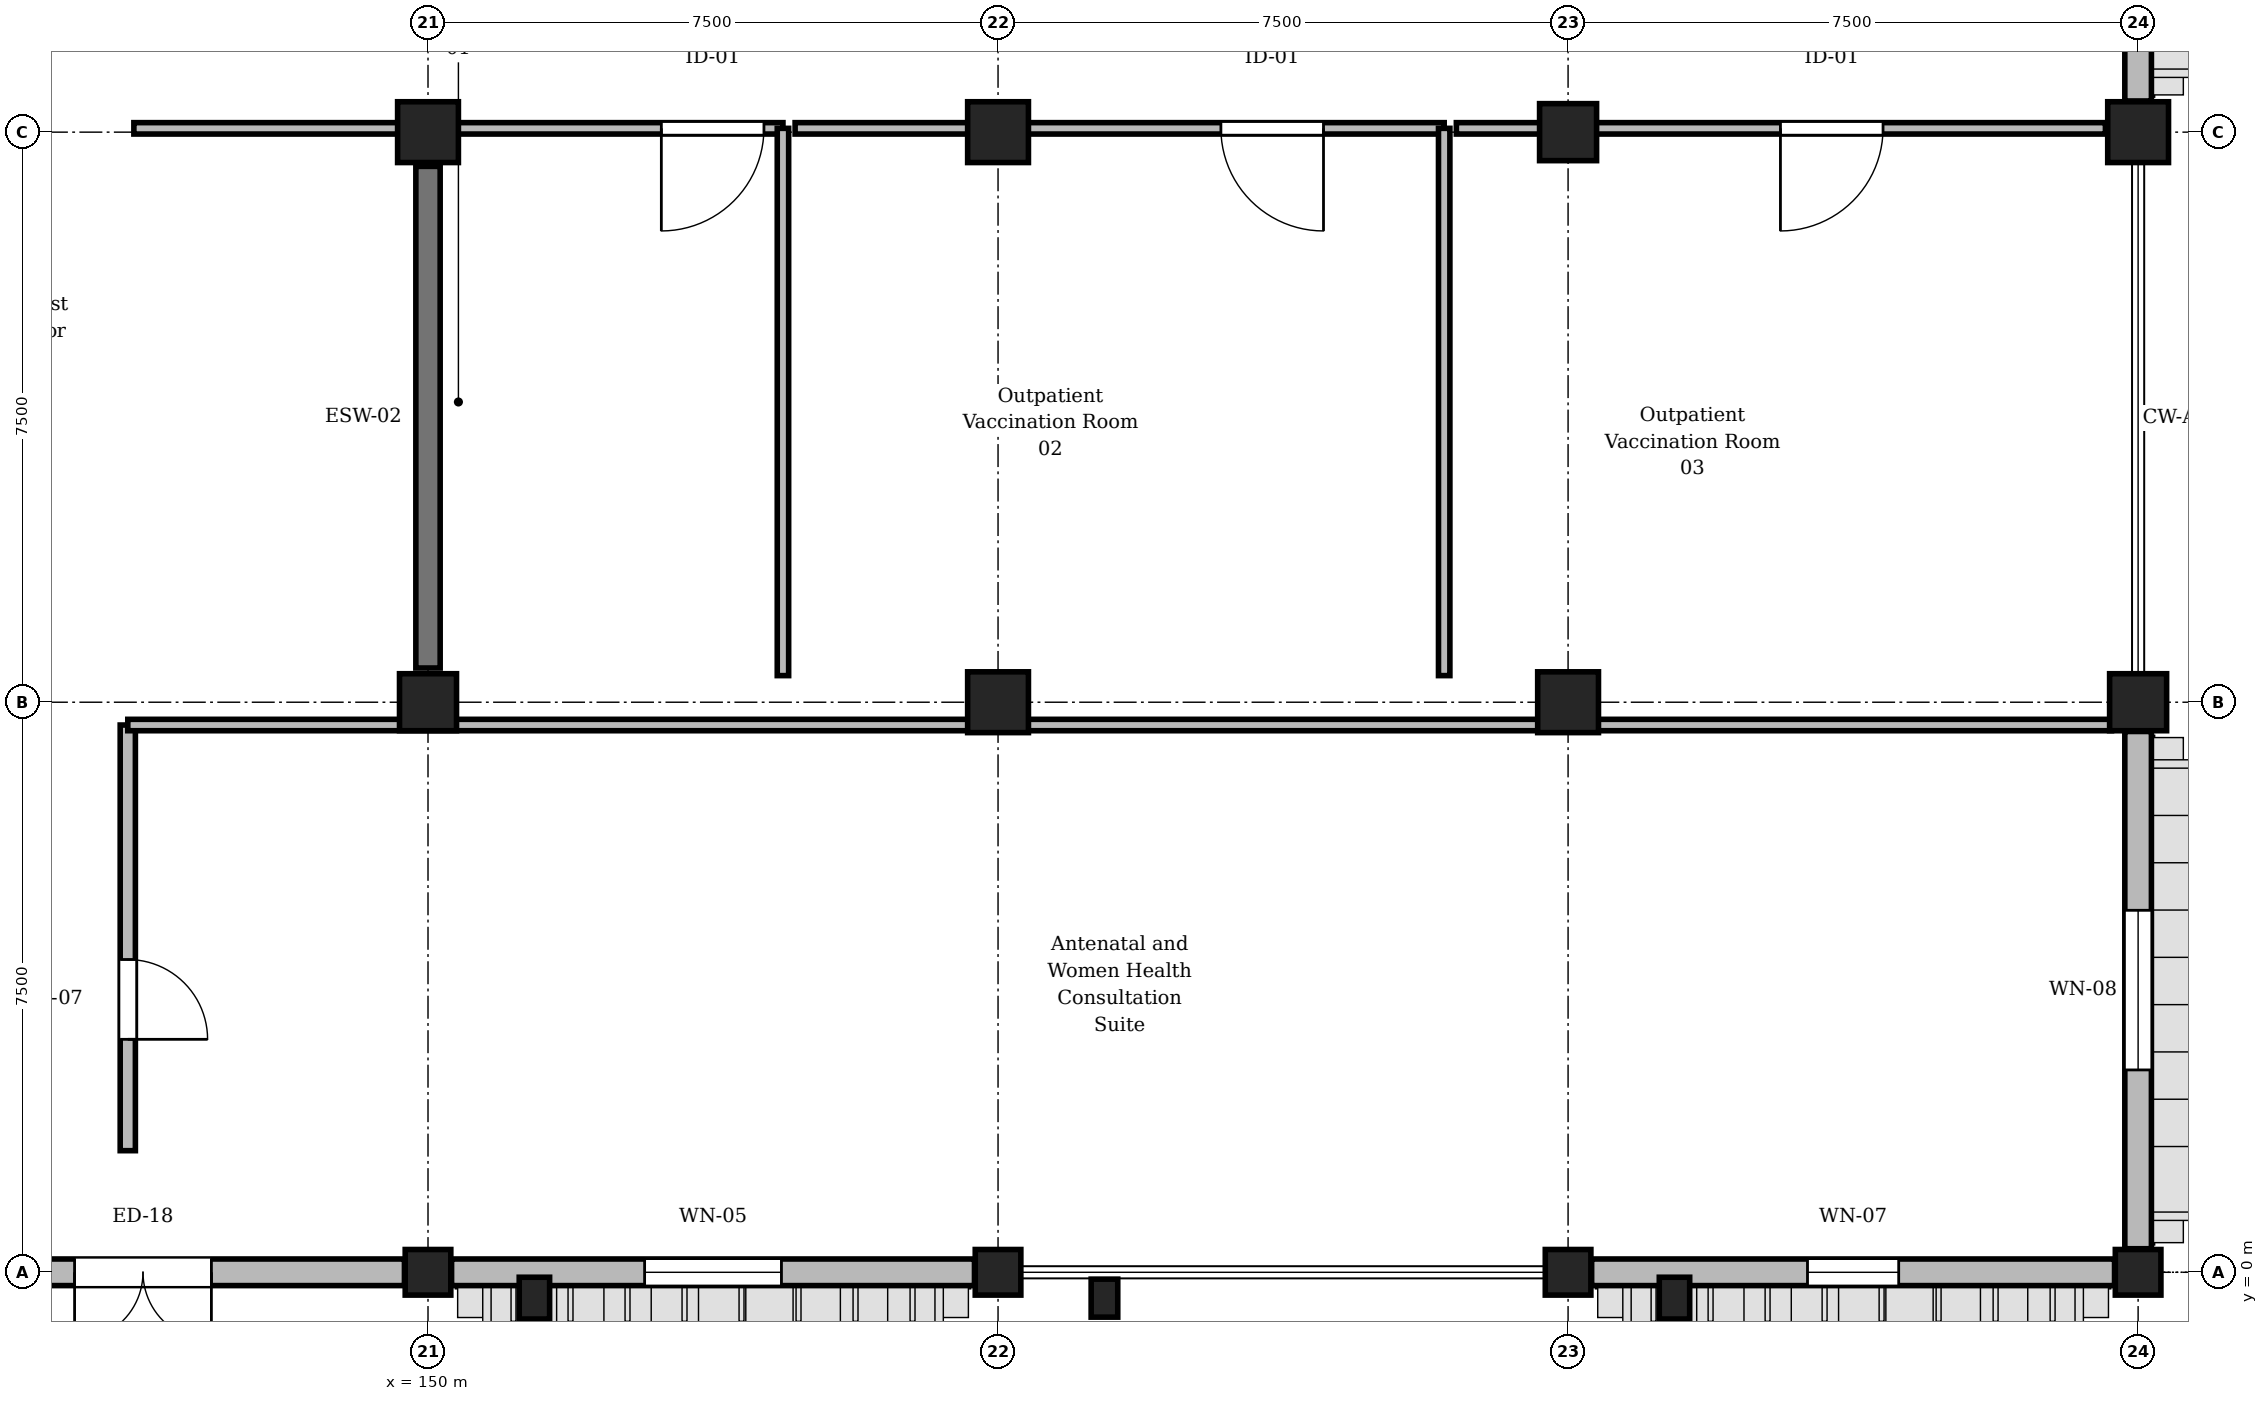
"""IFC4 building model, lengths in metres.
Left out: names, types, materials, properties, quantities, classifications, styles, units other than length and angle.
Written with IfcOpenShell. Run it as: python <this file> out.ifc"""

import sys

from ifc_helpers import new_model, si_unit, direction, frame, frame_2d, origin, origin_2d, place, context, subcontext, project, spatial, rectangle, circle, extrude, element, fill, save


model = new_model("IFC4")
c1 = context("Model", 3, precision=1e-05, world=origin(), true_north=direction((0.0, 1.0)))
c2 = subcontext(c1, "Body", "Model", "MODEL_VIEW")
j1 = project(units=[si_unit("LENGTHUNIT", "METRE"), si_unit("PLANEANGLEUNIT", "RADIAN")], contexts=[c1])
p1 = place(None, origin())
s1 = spatial("IfcSite", under=j1, at=p1, CompositionType="ELEMENT")
p2 = place(p1, origin())
s2 = spatial("IfcBuilding", under=s1, at=p2, CompositionType="ELEMENT")
p3 = place(p2, origin())
s3 = spatial("IfcBuildingStorey", under=s2, at=p3, CompositionType="ELEMENT", Elevation=0.0)
p4 = place(p3, frame((150.0, 0.0, 0.0), z_axis=(0.0, 0.0, 1.0), x_axis=(1.0, 0.0, 0.0)))
e1 = element("IfcColumn", 1, at=p4, inside=s3, PredefinedType="COLUMN", context=c2, shape_type="SweptSolid", body=[
    extrude(rectangle(XDim=0.6, YDim=0.6, at=origin_2d()), origin(), (0.0, 0.0, 1.0), 4.8),
])
p5 = place(p3, frame((150.0, 7.5, 0.0), z_axis=(0.0, 0.0, 1.0), x_axis=(1.0, 0.0, 0.0)))
e2 = element("IfcColumn", 2, at=p5, inside=s3, PredefinedType="COLUMN", context=c2, shape_type="SweptSolid", body=[
    extrude(circle(Radius=0.375, at=origin_2d()), origin(), (0.0, 0.0, 1.0), 4.8),
])
p6 = place(p3, frame((150.0, 15.0, 0.0), z_axis=(0.0, 0.0, 1.0), x_axis=(1.0, 0.0, 0.0)))
e3 = element("IfcColumn", 3, at=p6, inside=s3, PredefinedType="COLUMN", context=c2, shape_type="SweptSolid", body=[
    extrude(rectangle(XDim=0.8, YDim=0.8, at=origin_2d()), origin(), (0.0, 0.0, 1.0), 4.8),
])
p7 = place(p3, frame((157.5, 0.0, 0.0), z_axis=(0.0, 0.0, 1.0), x_axis=(1.0, 0.0, 0.0)))
e4 = element("IfcColumn", 4, at=p7, inside=s3, PredefinedType="COLUMN", context=c2, shape_type="SweptSolid", body=[
    extrude(circle(Radius=0.3, at=origin_2d()), origin(), (0.0, 0.0, 1.0), 4.8),
])
for number, where, z_axis, x_axis in (
    (5, (157.5, 7.5, 0.0), (0.0, 0.0, 1.0), (1.0, 0.0, 0.0)),
    (6, (157.5, 15.0, 0.0), (0.0, 0.0, 1.0), (1.0, 0.0, 0.0)),
):
    element("IfcColumn", number, at=place(p3, frame(where, z_axis=z_axis, x_axis=x_axis)), inside=s3, PredefinedType="COLUMN", context=c2, shape_type="SweptSolid", body=[
        extrude(rectangle(XDim=0.8, YDim=0.8, at=origin_2d()), origin(), (0.0, 0.0, 1.0), 4.8),
    ])
p8 = place(p3, frame((165.0, 0.0, 0.0), z_axis=(0.0, 0.0, 1.0), x_axis=(1.0, 0.0, 0.0)))
e7 = element("IfcColumn", 7, at=p8, inside=s3, PredefinedType="COLUMN", context=c2, shape_type="SweptSolid", body=[
    extrude(rectangle(XDim=0.6, YDim=0.6, at=origin_2d()), origin(), (0.0, 0.0, 1.0), 4.8),
])
p9 = place(p3, frame((165.0, 7.5, 0.0), z_axis=(0.0, 0.0, 1.0), x_axis=(1.0, 0.0, 0.0)))
e8 = element("IfcColumn", 8, at=p9, inside=s3, PredefinedType="COLUMN", context=c2, shape_type="SweptSolid", body=[
    extrude(rectangle(XDim=0.8, YDim=0.8, at=origin_2d()), origin(), (0.0, 0.0, 1.0), 4.8),
])
p10 = place(p3, frame((165.0, 15.0, 0.0), z_axis=(0.0, 0.0, 1.0), x_axis=(1.0, 0.0, 0.0)))
e9 = element("IfcColumn", 9, at=p10, inside=s3, PredefinedType="COLUMN", context=c2, shape_type="SweptSolid", body=[
    extrude(circle(Radius=0.375, at=origin_2d()), origin(), (0.0, 0.0, 1.0), 4.8),
])
p11 = place(p3, frame((172.5, 0.0, 0.0), z_axis=(0.0, 0.0, 1.0), x_axis=(1.0, 0.0, 0.0)))
e10 = element("IfcColumn", 10, at=p11, inside=s3, PredefinedType="COLUMN", context=c2, shape_type="SweptSolid", body=[
    extrude(rectangle(XDim=0.6, YDim=0.6, at=origin_2d()), origin(), (0.0, 0.0, 1.0), 4.8),
])
p12 = place(p3, frame((172.5, 7.5, 0.0), z_axis=(0.0, 0.0, 1.0), x_axis=(1.0, 0.0, 0.0)))
e11 = element("IfcColumn", 11, at=p12, inside=s3, PredefinedType="COLUMN", context=c2, shape_type="SweptSolid", body=[
    extrude(circle(Radius=0.375, at=origin_2d()), origin(), (0.0, 0.0, 1.0), 4.8),
])
p13 = place(p3, frame((172.5, 15.0, 0.0), z_axis=(0.0, 0.0, 1.0), x_axis=(1.0, 0.0, 0.0)))
e12 = element("IfcColumn", 12, at=p13, inside=s3, PredefinedType="COLUMN", context=c2, shape_type="SweptSolid", body=[
    extrude(rectangle(XDim=0.8, YDim=0.8, at=origin_2d()), origin(), (0.0, 0.0, 1.0), 4.8),
])
p14 = place(p3, frame((151.4, -0.34, 0.0), z_axis=(0.0, 0.0, 1.0), x_axis=(1.0, 0.0, 0.0)))
e13 = element("IfcColumn", 13, at=p14, inside=s3, PredefinedType="PILASTER", context=c2, shape_type="SweptSolid", body=[
    extrude(rectangle(XDim=0.4, YDim=0.55, at=origin_2d()), origin(), (0.0, 0.0, 1.0), 4.1),
])
p15 = place(p3, frame((158.9, -0.34, 0.0), z_axis=(0.0, 0.0, 1.0), x_axis=(1.0, 0.0, 0.0)))
e14 = element("IfcColumn", 14, at=p15, inside=s3, PredefinedType="PILASTER", context=c2, shape_type="SweptSolid", body=[
    extrude(rectangle(XDim=0.35, YDim=0.5, at=origin_2d()), origin(), (0.0, 0.0, 1.0), 4.1),
])
p16 = place(p3, frame((166.4, -0.34, 0.0), z_axis=(0.0, 0.0, 1.0), x_axis=(1.0, 0.0, 0.0)))
e15 = element("IfcColumn", 15, at=p16, inside=s3, PredefinedType="PILASTER", context=c2, shape_type="SweptSolid", body=[
    extrude(rectangle(XDim=0.4, YDim=0.55, at=origin_2d()), origin(), (0.0, 0.0, 1.0), 4.1),
])
p17 = place(p3, frame((150.0, 7.95, 0.0), z_axis=(0.0, 0.0, 1.0), x_axis=(0.0, 1.0, 0.0)))
e16 = element("IfcWall", 16, at=p17, inside=s3, PredefinedType="SHEAR", context=c2, shape_type="SweptSolid", body=[
    extrude(rectangle(XDim=6.6, YDim=0.32, at=frame_2d((3.3, 0.0))), origin(), (0.0, 0.0, 1.0), 3.95),
])
p18 = place(p3, frame((149.69, 0.0, 0.0), z_axis=(0.0, 0.0, 1.0), x_axis=(-1.0, 0.0, 0.0)))
e17 = element("IfcWall", 17, at=p18, inside=s3, PredefinedType="STANDARD", context=c2, shape_type="SweptSolid", body=[
    extrude(rectangle(XDim=6.88, YDim=0.35, at=frame_2d((3.44, 0.0))), origin(), (0.0, 0.0, 1.0), 3.95),
])
p19 = place(p18, frame((2.54, 0.0, 0.0)))
e18 = element("IfcOpeningElement", 18, at=p19, cuts=e17, PredefinedType="OPENING", context=c2, shape_type="SweptSolid", body=[
    extrude(rectangle(XDim=1.8, YDim=2.5, at=frame_2d((0.9, 1.25))), frame((0.0, 0.185, 0.0), z_axis=(0.0, -1.0, 0.0), x_axis=(1.0, 0.0, 0.0)), (0.0, 0.0, 1.0), 0.37),
])
p20 = place(p3, frame((157.19, 0.0, 0.0), z_axis=(0.0, 0.0, 1.0), x_axis=(-1.0, 0.0, 0.0)))
e19 = element("IfcWall", 19, at=p20, inside=s3, PredefinedType="STANDARD", context=c2, shape_type="SweptSolid", body=[
    extrude(rectangle(XDim=6.88, YDim=0.35, at=frame_2d((3.44, 0.0))), origin(), (0.0, 0.0, 1.0), 3.95),
])
p21 = place(p20, frame((2.54, 0.0, 0.9)))
e20 = element("IfcOpeningElement", 20, at=p21, cuts=e19, PredefinedType="OPENING", context=c2, shape_type="SweptSolid", body=[
    extrude(rectangle(XDim=1.8, YDim=2.1, at=frame_2d((0.9, 1.05))), frame((0.0, 0.185, 0.0), z_axis=(0.0, -1.0, 0.0), x_axis=(1.0, 0.0, 0.0)), (0.0, 0.0, 1.0), 0.37),
])
p22 = place(p3, frame((172.19, 0.0, 0.0), z_axis=(0.0, 0.0, 1.0), x_axis=(-1.0, 0.0, 0.0)))
e21 = element("IfcWall", 21, at=p22, inside=s3, PredefinedType="STANDARD", context=c2, shape_type="SweptSolid", body=[
    extrude(rectangle(XDim=6.88, YDim=0.35, at=frame_2d((3.44, 0.0))), origin(), (0.0, 0.0, 1.0), 3.95),
])
p23 = place(p22, frame((2.84, 0.0, 0.9)))
e22 = element("IfcOpeningElement", 22, at=p23, cuts=e21, PredefinedType="OPENING", context=c2, shape_type="SweptSolid", body=[
    extrude(rectangle(XDim=1.2, YDim=2.1, at=frame_2d((0.6, 1.05))), frame((0.0, 0.185, 0.0), z_axis=(0.0, -1.0, 0.0), x_axis=(1.0, 0.0, 0.0)), (0.0, 0.0, 1.0), 0.37),
])
p24 = place(p3, frame((172.5, 7.115, 0.0), z_axis=(0.0, 0.0, 1.0), x_axis=(0.0, -1.0, 0.0)))
e23 = element("IfcWall", 23, at=p24, inside=s3, PredefinedType="STANDARD", context=c2, shape_type="SweptSolid", body=[
    extrude(rectangle(XDim=6.805, YDim=0.35, at=frame_2d((3.402, 0.0))), origin(), (0.0, 0.0, 1.0), 3.9),
])
p25 = place(p24, frame((2.353, 0.0, 0.9)))
e24 = element("IfcOpeningElement", 24, at=p25, cuts=e23, PredefinedType="OPENING", context=c2, shape_type="SweptSolid", body=[
    extrude(rectangle(XDim=2.1, YDim=2.1, at=frame_2d((1.05, 1.05))), frame((0.0, 0.185, 0.0), z_axis=(0.0, -1.0, 0.0), x_axis=(1.0, 0.0, 0.0)), (0.0, 0.0, 1.0), 0.37),
])
p26 = place(p3, frame((172.5, 22.09, 0.0), z_axis=(0.0, 0.0, 1.0), x_axis=(0.0, -1.0, 0.0)))
e25 = element("IfcWall", 25, at=p26, inside=s3, PredefinedType="STANDARD", context=c2, shape_type="SweptSolid", body=[
    extrude(rectangle(XDim=6.68, YDim=0.35, at=frame_2d((3.34, 0.0))), origin(), (0.0, 0.0, 1.0), 3.9),
])
p27 = place(p26, frame((2.54, 0.0, 0.9)))
e26 = element("IfcOpeningElement", 26, at=p27, cuts=e25, PredefinedType="OPENING", context=c2, shape_type="SweptSolid", body=[
    extrude(rectangle(XDim=1.6, YDim=1.95, at=frame_2d((0.8, 0.975))), frame((0.0, 0.185, 0.0), z_axis=(0.0, -1.0, 0.0), x_axis=(1.0, 0.0, 0.0)), (0.0, 0.0, 1.0), 0.37),
])
p28 = place(p3, frame((146.05, 7.2, 0.0), z_axis=(0.0, 0.0, 1.0), x_axis=(0.0, -1.0, 0.0)))
e27 = element("IfcWall", 27, at=p28, inside=s3, PredefinedType="STANDARD", context=c2, shape_type="SweptSolid", body=[
    extrude(rectangle(XDim=5.6, YDim=0.2, at=frame_2d((2.8, 0.0))), origin(), (0.0, 0.0, 1.0), 4.485),
])
p29 = place(p28, frame((3.085, 0.0, 0.0)))
e28 = element("IfcOpeningElement", 28, at=p29, cuts=e27, PredefinedType="OPENING", context=c2, shape_type="SweptSolid", body=[
    extrude(rectangle(XDim=1.05, YDim=2.2, at=frame_2d((0.525, 1.1))), frame((0.0, 0.11, 0.0), z_axis=(0.0, -1.0, 0.0), x_axis=(1.0, 0.0, 0.0)), (0.0, 0.0, 1.0), 0.22),
])
p30 = place(p3, frame((154.67, 15.05, 0.0), z_axis=(0.0, 0.0, 1.0), x_axis=(-1.0, 0.0, 0.0)))
e29 = element("IfcWall", 29, at=p30, inside=s3, PredefinedType="PARTITIONING", context=c2, shape_type="SweptSolid", body=[
    extrude(rectangle(XDim=8.54, YDim=0.15, at=frame_2d((4.27, 0.0))), origin(), (0.0, 0.0, 1.0), 3.835),
])
p31 = place(p30, frame((0.25, 0.0, 0.0)))
e30 = element("IfcOpeningElement", 30, at=p31, cuts=e29, PredefinedType="OPENING", context=c2, shape_type="SweptSolid", body=[
    extrude(rectangle(XDim=1.35, YDim=2.25, at=frame_2d((0.675, 1.125))), frame((0.0, 0.085, 0.0), z_axis=(0.0, -1.0, 0.0), x_axis=(1.0, 0.0, 0.0)), (0.0, 0.0, 1.0), 0.17),
])
p32 = place(p3, frame((163.37, 15.05, 0.0), z_axis=(0.0, 0.0, 1.0), x_axis=(-1.0, 0.0, 0.0)))
e31 = element("IfcWall", 31, at=p32, inside=s3, PredefinedType="PARTITIONING", context=c2, shape_type="SweptSolid", body=[
    extrude(rectangle(XDim=8.54, YDim=0.15, at=frame_2d((4.27, 0.0))), origin(), (0.0, 0.0, 1.0), 3.835),
])
p33 = place(p32, frame((1.588, 0.0, 0.0)))
e32 = element("IfcOpeningElement", 32, at=p33, cuts=e31, PredefinedType="OPENING", context=c2, shape_type="SweptSolid", body=[
    extrude(rectangle(XDim=1.35, YDim=2.25, at=frame_2d((0.675, 1.125))), frame((0.0, 0.085, 0.0), z_axis=(0.0, -1.0, 0.0), x_axis=(1.0, 0.0, 0.0)), (0.0, 0.0, 1.0), 0.17),
])
p34 = place(p3, frame((172.07, 15.05, 0.0), z_axis=(0.0, 0.0, 1.0), x_axis=(-1.0, 0.0, 0.0)))
e33 = element("IfcWall", 33, at=p34, inside=s3, PredefinedType="PARTITIONING", context=c2, shape_type="SweptSolid", body=[
    extrude(rectangle(XDim=8.54, YDim=0.15, at=frame_2d((4.27, 0.0))), origin(), (0.0, 0.0, 1.0), 3.835),
])
p35 = place(p34, frame((2.926, 0.0, 0.0)))
e34 = element("IfcOpeningElement", 34, at=p35, cuts=e33, PredefinedType="OPENING", context=c2, shape_type="SweptSolid", body=[
    extrude(rectangle(XDim=1.35, YDim=2.25, at=frame_2d((0.675, 1.125))), frame((0.0, 0.085, 0.0), z_axis=(0.0, -1.0, 0.0), x_axis=(1.0, 0.0, 0.0)), (0.0, 0.0, 1.0), 0.17),
])
p36 = place(p3, frame((146.05, 7.2, 0.0), z_axis=(0.0, 0.0, 1.0), x_axis=(1.0, 0.0, 0.0)))
e35 = element("IfcWall", 35, at=p36, inside=s3, PredefinedType="PARTITIONING", context=c2, shape_type="SweptSolid", body=[
    extrude(rectangle(XDim=26.1, YDim=0.15, at=frame_2d((13.05, 0.0))), origin(), (0.0, 0.0, 1.0), 3.835),
])
for number, where, z_axis, x_axis in (
    (36, (154.67, 7.85, 0.0), (0.0, 0.0, 1.0), (0.0, 1.0, 0.0)),
    (37, (163.37, 7.85, 0.0), (0.0, 0.0, 1.0), (0.0, 1.0, 0.0)),
):
    element("IfcWall", number, at=place(p3, frame(where, z_axis=z_axis, x_axis=x_axis)), inside=s3, PredefinedType="PARTITIONING", context=c2, shape_type="SweptSolid", body=[
        extrude(rectangle(XDim=7.2, YDim=0.15, at=frame_2d((3.6, 0.0))), origin(), (0.0, 0.0, 1.0), 4.485),
    ])
p37 = place(p19, origin())
e38 = element("IfcDoor", 38, at=p37, inside=s3, OperationType="DOUBLE_DOOR_SINGLE_SWING", PredefinedType="DOOR", context=c2, shape_type="SweptSolid", body=[
    extrude(rectangle(XDim=1.8, YDim=2.5, at=frame_2d((0.9, 1.25))), frame((0.0, 0.025, 0.0), z_axis=(0.0, -1.0, 0.0), x_axis=(1.0, 0.0, 0.0)), (0.0, 0.0, 1.0), 0.05),
])
fill(e18, e38)
p38 = place(p21, origin())
e39 = element("IfcWindow", 39, at=p38, inside=s3, PartitioningType="SINGLE_PANEL", PredefinedType="WINDOW", context=c2, shape_type="SweptSolid", body=[
    extrude(rectangle(XDim=1.8, YDim=2.1, at=frame_2d((0.9, 1.05))), frame((0.0, 0.03, 0.0), z_axis=(0.0, -1.0, 0.0), x_axis=(1.0, 0.0, 0.0)), (0.0, 0.0, 1.0), 0.06),
])
fill(e20, e39)
p39 = place(p23, origin())
e40 = element("IfcWindow", 40, at=p39, inside=s3, PartitioningType="SINGLE_PANEL", PredefinedType="WINDOW", context=c2, shape_type="SweptSolid", body=[
    extrude(rectangle(XDim=1.2, YDim=2.1, at=frame_2d((0.6, 1.05))), frame((0.0, 0.03, 0.0), z_axis=(0.0, -1.0, 0.0), x_axis=(1.0, 0.0, 0.0)), (0.0, 0.0, 1.0), 0.06),
])
fill(e22, e40)
p40 = place(p25, origin())
e41 = element("IfcWindow", 41, at=p40, inside=s3, PartitioningType="SINGLE_PANEL", PredefinedType="WINDOW", context=c2, shape_type="SweptSolid", body=[
    extrude(rectangle(XDim=2.1, YDim=2.1, at=frame_2d((1.05, 1.05))), frame((0.0, 0.03, 0.0), z_axis=(0.0, -1.0, 0.0), x_axis=(1.0, 0.0, 0.0)), (0.0, 0.0, 1.0), 0.06),
])
fill(e24, e41)
p41 = place(p29, origin())
e42 = element("IfcDoor", 42, at=p41, inside=s3, OperationType="SINGLE_SWING_RIGHT", PredefinedType="DOOR", context=c2, shape_type="SweptSolid", body=[
    extrude(rectangle(XDim=1.05, YDim=2.2, at=frame_2d((0.525, 1.1))), frame((0.0, 0.025, 0.0), z_axis=(0.0, -1.0, 0.0), x_axis=(1.0, 0.0, 0.0)), (0.0, 0.0, 1.0), 0.05),
])
fill(e28, e42)
p42 = place(p31, origin())
e43 = element("IfcDoor", 43, at=p42, inside=s3, OperationType="SINGLE_SWING_RIGHT", PredefinedType="DOOR", context=c2, shape_type="SweptSolid", body=[
    extrude(rectangle(XDim=1.35, YDim=2.25, at=frame_2d((0.675, 1.125))), frame((0.0, 0.025, 0.0), z_axis=(0.0, -1.0, 0.0), x_axis=(1.0, 0.0, 0.0)), (0.0, 0.0, 1.0), 0.05),
])
fill(e30, e43)
p43 = place(p33, origin())
e44 = element("IfcDoor", 44, at=p43, inside=s3, OperationType="SINGLE_SWING_LEFT", PredefinedType="DOOR", context=c2, shape_type="SweptSolid", body=[
    extrude(rectangle(XDim=1.35, YDim=2.25, at=frame_2d((0.675, 1.125))), frame((0.0, 0.025, 0.0), z_axis=(0.0, -1.0, 0.0), x_axis=(1.0, 0.0, 0.0)), (0.0, 0.0, 1.0), 0.05),
])
fill(e32, e44)
p44 = place(p35, origin())
e45 = element("IfcDoor", 45, at=p44, inside=s3, OperationType="SINGLE_SWING_RIGHT", PredefinedType="DOOR", context=c2, shape_type="SweptSolid", body=[
    extrude(rectangle(XDim=1.35, YDim=2.25, at=frame_2d((0.675, 1.125))), frame((0.0, 0.025, 0.0), z_axis=(0.0, -1.0, 0.0), x_axis=(1.0, 0.0, 0.0)), (0.0, 0.0, 1.0), 0.05),
])
fill(e34, e45)
save(model, sys.argv[1])
